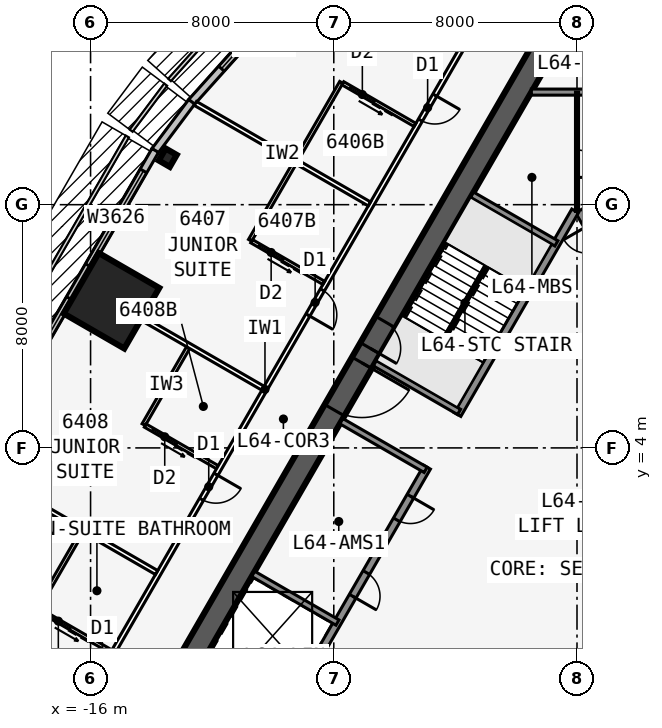
"""IFC4 building model, lengths in metres.
Left out: names, types, materials, properties, quantities, classifications, styles, units other than length and angle.
Written with IfcOpenShell. Run it as: python <this file> out.ifc"""

import sys

from ifc_helpers import new_model, si_unit, direction, frame, frame_2d, origin, origin_2d, place, context, subcontext, project, spatial, rectangle, i_section, extrude, element, fill, save


model = new_model("IFC4")
c1 = context("Model", 3, precision=1e-05, world=origin(), true_north=direction((0.0, 1.0)))
c2 = subcontext(c1, "Body", "Model", "MODEL_VIEW")
j1 = project(units=[si_unit("LENGTHUNIT", "METRE"), si_unit("PLANEANGLEUNIT", "RADIAN")], contexts=[c1])
p1 = place(None, origin())
s1 = spatial("IfcSite", under=j1, at=p1, CompositionType="ELEMENT")
p2 = place(p1, origin())
s2 = spatial("IfcBuilding", under=s1, at=p2, CompositionType="ELEMENT")
p3 = place(p2, frame((0.0, 0.0, 242.9)))
s3 = spatial("IfcBuildingStorey", under=s2, at=p3, CompositionType="ELEMENT", Elevation=242.9)
p4 = place(p3, frame((16.5, -9.526, 0.0), z_axis=(0.0, 0.0, 1.0), x_axis=(-0.499999749417, 0.866025548458, 0.0)))
e1 = element("IfcWall", 1, at=p4, inside=s3, PredefinedType="SHEAR", context=c2, shape_type="SweptSolid", body=[
    extrude(rectangle(XDim=33.0, YDim=0.75, at=frame_2d((16.5, 0.0))), origin(), (0.0, 0.0, 1.0), 3.6),
])
p5 = place(p4, frame((14.15, 0.0, 0.0)))
e2 = element("IfcOpeningElement", 2, at=p5, cuts=e1, PredefinedType="OPENING", context=c2, shape_type="SweptSolid", body=[
    extrude(rectangle(XDim=1.8, YDim=2.13, at=frame_2d((0.9, 1.065))), frame((0.0, 0.385, 0.0), z_axis=(0.0, -1.0, 0.0), x_axis=(1.0, 0.0, 0.0)), (0.0, 0.0, 1.0), 0.77),
])
p6 = place(p4, frame((12.6, 0.0, 0.0)))
e3 = element("IfcOpeningElement", 3, at=p6, cuts=e1, PredefinedType="OPENING", context=c2, shape_type="SweptSolid", body=[
    extrude(rectangle(XDim=1.0, YDim=2.13, at=frame_2d((0.5, 1.065))), frame((0.0, 0.385, 0.0), z_axis=(0.0, -1.0, 0.0), x_axis=(1.0, 0.0, 0.0)), (0.0, 0.0, 1.0), 0.77),
])
p7 = place(p3, frame((5.379, 2.586, 0.0), z_axis=(0.0, 0.0, 1.0), x_axis=(-0.500001375892, 0.866024609411, 0.0)))
e4 = element("IfcWall", 4, at=p7, inside=s3, PredefinedType="SOLIDWALL", context=c2, shape_type="SweptSolid", body=[
    extrude(rectangle(XDim=10.633, YDim=0.25, at=frame_2d((5.316, 0.0))), origin(), (0.0, 0.0, 1.0), 3.435),
])
p8 = place(p7, frame((9.164, 0.0, 0.0)))
e5 = element("IfcOpeningElement", 5, at=p8, cuts=e4, PredefinedType="OPENING", context=c2, shape_type="SweptSolid", body=[
    extrude(rectangle(XDim=0.9, YDim=2.13, at=frame_2d((0.45, 1.065))), frame((0.0, 0.135, 0.0), z_axis=(0.0, -1.0, 0.0), x_axis=(1.0, 0.0, 0.0)), (0.0, 0.0, 1.0), 0.27),
])
p9 = place(p7, frame((1.0, 0.0, 0.0)))
e6 = element("IfcOpeningElement", 6, at=p9, cuts=e4, PredefinedType="OPENING", context=c2, shape_type="SweptSolid", body=[
    extrude(rectangle(XDim=1.1, YDim=2.13, at=frame_2d((0.55, 1.065))), frame((0.0, 0.135, 0.0), z_axis=(0.0, -1.0, 0.0), x_axis=(1.0, 0.0, 0.0)), (0.0, 0.0, 1.0), 0.27),
])
p10 = place(p7, frame((3.9, 0.0, 0.0)))
e7 = element("IfcOpeningElement", 7, at=p10, cuts=e4, PredefinedType="OPENING", context=c2, shape_type="SweptSolid", body=[
    extrude(rectangle(XDim=1.1, YDim=2.13, at=frame_2d((0.55, 1.065))), frame((0.0, 0.135, 0.0), z_axis=(0.0, -1.0, 0.0), x_axis=(1.0, 0.0, 0.0)), (0.0, 0.0, 1.0), 0.27),
])
p11 = place(p7, frame((6.8, 0.0, 0.0)))
e8 = element("IfcOpeningElement", 8, at=p11, cuts=e4, PredefinedType="OPENING", context=c2, shape_type="SweptSolid", body=[
    extrude(rectangle(XDim=1.1, YDim=2.13, at=frame_2d((0.55, 1.065))), frame((0.0, 0.135, 0.0), z_axis=(0.0, -1.0, 0.0), x_axis=(1.0, 0.0, 0.0)), (0.0, 0.0, 1.0), 0.27),
])
p12 = place(p3, frame((0.0, 19.052, 0.0), z_axis=(0.0, 0.0, 1.0), x_axis=(-0.499999749417, -0.866025548458, 0.0)))
e9 = element("IfcWall", 9, at=p12, inside=s3, PredefinedType="SHEAR", context=c2, shape_type="SweptSolid", body=[
    extrude(rectangle(XDim=33.0, YDim=0.75, at=frame_2d((16.5, 0.0))), origin(), (0.0, 0.0, 1.0), 3.6),
])
p13 = place(p12, frame((14.15, 0.0, 0.0)))
e10 = element("IfcOpeningElement", 10, at=p13, cuts=e9, PredefinedType="OPENING", context=c2, shape_type="SweptSolid", body=[
    extrude(rectangle(XDim=1.8, YDim=2.13, at=frame_2d((0.9, 1.065))), frame((0.0, 0.385, 0.0), z_axis=(0.0, -1.0, 0.0), x_axis=(1.0, 0.0, 0.0)), (0.0, 0.0, 1.0), 0.77),
])
p14 = place(p12, frame((12.6, 0.0, 0.0)))
e11 = element("IfcOpeningElement", 11, at=p14, cuts=e9, PredefinedType="OPENING", context=c2, shape_type="SweptSolid", body=[
    extrude(rectangle(XDim=1.0, YDim=2.13, at=frame_2d((0.5, 1.065))), frame((0.0, 0.385, 0.0), z_axis=(0.0, -1.0, 0.0), x_axis=(1.0, 0.0, 0.0)), (0.0, 0.0, 1.0), 0.77),
])
p15 = place(p3, frame((-0.062, 11.794, 0.0), z_axis=(0.0, 0.0, 1.0), x_axis=(-0.500006680225, -0.86602154692, 0.0)))
e12 = element("IfcWall", 12, at=p15, inside=s3, PredefinedType="SOLIDWALL", context=c2, shape_type="SweptSolid", body=[
    extrude(rectangle(XDim=7.733, YDim=0.25, at=frame_2d((3.866, 0.0))), origin(), (0.0, 0.0, 1.0), 3.435),
])
p16 = place(p3, frame((-4.929, 3.365, 0.0), z_axis=(0.0, 0.0, 1.0), x_axis=(-0.499991433582, -0.866030349552, 0.0)))
e13 = element("IfcWall", 13, at=p16, inside=s3, PredefinedType="SOLIDWALL", context=c2, shape_type="SweptSolid", body=[
    extrude(rectangle(XDim=10.633, YDim=0.25, at=frame_2d((5.316, 0.0))), origin(), (0.0, 0.0, 1.0), 3.435),
])
p17 = place(p16, frame((9.164, 0.0, 0.0)))
e14 = element("IfcOpeningElement", 14, at=p17, cuts=e13, PredefinedType="OPENING", context=c2, shape_type="SweptSolid", body=[
    extrude(rectangle(XDim=0.9, YDim=2.13, at=frame_2d((0.45, 1.065))), frame((0.0, 0.135, 0.0), z_axis=(0.0, -1.0, 0.0), x_axis=(1.0, 0.0, 0.0)), (0.0, 0.0, 1.0), 0.27),
])
p18 = place(p16, frame((1.1, 0.0, 0.0)))
e15 = element("IfcOpeningElement", 15, at=p18, cuts=e13, PredefinedType="OPENING", context=c2, shape_type="SweptSolid", body=[
    extrude(rectangle(XDim=0.9, YDim=2.13, at=frame_2d((0.45, 1.065))), frame((0.0, 0.135, 0.0), z_axis=(0.0, -1.0, 0.0), x_axis=(1.0, 0.0, 0.0)), (0.0, 0.0, 1.0), 0.27),
])
p19 = place(p16, frame((4.0, 0.0, 0.0)))
e16 = element("IfcOpeningElement", 16, at=p19, cuts=e13, PredefinedType="OPENING", context=c2, shape_type="SweptSolid", body=[
    extrude(rectangle(XDim=0.9, YDim=2.13, at=frame_2d((0.45, 1.065))), frame((0.0, 0.135, 0.0), z_axis=(0.0, -1.0, 0.0), x_axis=(1.0, 0.0, 0.0)), (0.0, 0.0, 1.0), 0.27),
])
for number, where, z_axis, x_axis in (
    (17, (-0.679, 10.727, 0.0), (0.0, 0.0, 1.0), (-0.866, 0.5, 0.0)),
    (18, (-3.879, 5.184, 0.0), (0.0, 0.0, 1.0), (-0.866, 0.5, 0.0)),
    (19, (-4.979, 3.279, 0.0), (0.0, 0.0, 1.0), (-0.866, 0.5, 0.0)),
    (20, (-7.879, -1.744, 0.0), (0.0, 0.0, 1.0), (-0.866, 0.5, 0.0)),
):
    element("IfcWall", number, at=place(p3, frame(where, z_axis=z_axis, x_axis=x_axis)), inside=s3, PredefinedType="SOLIDWALL", context=c2, shape_type="SweptSolid", body=[
        extrude(rectangle(XDim=3.2, YDim=0.2, at=frame_2d((1.6, 0.0))), origin(), (0.0, 0.0, 1.0), 3.435),
    ])
p20 = place(p3, frame((-13.461, 13.545, 0.0), z_axis=(0.0, 0.0, 1.0), x_axis=(-0.866025403784, 0.5, 0.0)))
e21 = element("IfcColumn", 21, at=p20, inside=s3, PredefinedType="COLUMN", context=c2, shape_type="SweptSolid", body=[
    extrude(i_section(OverallWidth=0.419, OverallDepth=0.455, WebThickness=0.042, FlangeThickness=0.068, at=origin_2d()), origin(), (0.0, 0.0, 1.0), 3.6),
])
p21 = place(p3, frame((-15.312, 8.84, 0.0), z_axis=(0.0, 0.0, 1.0), x_axis=(-0.866025403784, 0.5, 0.0)))
e22 = element("IfcColumn", 22, at=p21, inside=s3, PredefinedType="COLUMN", context=c2, shape_type="SweptSolid", body=[
    extrude(rectangle(XDim=2.3, YDim=2.3, at=origin_2d()), origin(), (0.0, 0.0, 1.0), 3.6),
])
p22 = place(p3, frame((-7.907, 20.701, 0.0), z_axis=(0.0, 0.0, 1.0), x_axis=(-0.667303550892, -0.744785855778, 0.0)))
e23 = element("IfcWall", 23, at=p22, inside=s3, PredefinedType="STANDARD", context=c2, shape_type="SweptSolid", body=[
    extrude(rectangle(XDim=7.153, YDim=0.25, at=frame_2d((3.576, 0.0))), origin(), (0.0, 0.0, 1.0), 3.435),
])
p23 = place(p22, frame((1.476, 0.0, 0.45)))
e24 = element("IfcOpeningElement", 24, at=p23, cuts=e23, PredefinedType="OPENING", context=c2, shape_type="SweptSolid", body=[
    extrude(rectangle(XDim=4.2, YDim=2.6, at=frame_2d((2.1, 1.3))), frame((0.0, 0.135, 0.0), z_axis=(0.0, -1.0, 0.0), x_axis=(1.0, 0.0, 0.0)), (0.0, 0.0, 1.0), 0.27),
])
p24 = place(p3, frame((-12.673, 15.382, 0.0), z_axis=(0.0, 0.0, 1.0), x_axis=(-0.599650843534, -0.800261748335, 0.0)))
e25 = element("IfcWall", 25, at=p24, inside=s3, PredefinedType="STANDARD", context=c2, shape_type="SweptSolid", body=[
    extrude(rectangle(XDim=2.014, YDim=0.25, at=frame_2d((1.007, 0.0))), origin(), (0.0, 0.0, 1.0), 3.435),
])
p25 = place(p3, frame((-13.873, 13.783, 0.0), z_axis=(0.0, 0.0, 1.0), x_axis=(-0.499993662806, -0.866029062534, 0.0)))
e26 = element("IfcWall", 26, at=p25, inside=s3, PredefinedType="STANDARD", context=c2, shape_type="SweptSolid", body=[
    extrude(rectangle(XDim=10.0, YDim=0.25, at=frame_2d((5.0, 0.0))), origin(), (0.0, 0.0, 1.0), 3.435),
])
p26 = place(p25, frame((0.775, 0.0, 0.45)))
e27 = element("IfcOpeningElement", 27, at=p26, cuts=e26, PredefinedType="OPENING", context=c2, shape_type="SweptSolid", body=[
    extrude(rectangle(XDim=3.6, YDim=2.6, at=frame_2d((1.8, 1.3))), frame((0.0, 0.135, 0.0), z_axis=(0.0, -1.0, 0.0), x_axis=(1.0, 0.0, 0.0)), (0.0, 0.0, 1.0), 0.27),
])
p27 = place(p25, frame((5.625, 0.0, 0.45)))
e28 = element("IfcOpeningElement", 28, at=p27, cuts=e26, PredefinedType="OPENING", context=c2, shape_type="SweptSolid", body=[
    extrude(rectangle(XDim=3.6, YDim=2.6, at=frame_2d((1.8, 1.3))), frame((0.0, 0.135, 0.0), z_axis=(0.0, -1.0, 0.0), x_axis=(1.0, 0.0, 0.0)), (0.0, 0.0, 1.0), 0.27),
])
p28 = place(p3, frame((-0.425, 22.966, 0.0), z_axis=(0.0, 0.0, 1.0), x_axis=(-0.500000265775, -0.866025250339, 0.0)))
e29 = element("IfcWall", 29, at=p28, inside=s3, PredefinedType="PARTITIONING", context=c2, shape_type="SweptSolid", body=[
    extrude(rectangle(XDim=39.354, YDim=0.15, at=frame_2d((19.677, 0.0))), origin(), (0.0, 0.0, 1.0), 3.435),
])
p29 = place(p28, frame((8.502, 0.0, 0.0)))
e30 = element("IfcOpeningElement", 30, at=p29, cuts=e29, PredefinedType="OPENING", context=c2, shape_type="SweptSolid", body=[
    extrude(rectangle(XDim=0.95, YDim=2.13, at=frame_2d((0.475, 1.065))), frame((0.0, 0.085, 0.0), z_axis=(0.0, -1.0, 0.0), x_axis=(1.0, 0.0, 0.0)), (0.0, 0.0, 1.0), 0.17),
])
p30 = place(p28, frame((15.902, 0.0, 0.0)))
e31 = element("IfcOpeningElement", 31, at=p30, cuts=e29, PredefinedType="OPENING", context=c2, shape_type="SweptSolid", body=[
    extrude(rectangle(XDim=0.95, YDim=2.13, at=frame_2d((0.475, 1.065))), frame((0.0, 0.085, 0.0), z_axis=(0.0, -1.0, 0.0), x_axis=(1.0, 0.0, 0.0)), (0.0, 0.0, 1.0), 0.17),
])
p31 = place(p28, frame((22.902, 0.0, 0.0)))
e32 = element("IfcOpeningElement", 32, at=p31, cuts=e29, PredefinedType="OPENING", context=c2, shape_type="SweptSolid", body=[
    extrude(rectangle(XDim=0.95, YDim=2.13, at=frame_2d((0.475, 1.065))), frame((0.0, 0.085, 0.0), z_axis=(0.0, -1.0, 0.0), x_axis=(1.0, 0.0, 0.0)), (0.0, 0.0, 1.0), 0.17),
])
p32 = place(p28, frame((29.902, 0.0, 0.0)))
e33 = element("IfcOpeningElement", 33, at=p32, cuts=e29, PredefinedType="OPENING", context=c2, shape_type="SweptSolid", body=[
    extrude(rectangle(XDim=0.95, YDim=2.13, at=frame_2d((0.475, 1.065))), frame((0.0, 0.085, 0.0), z_axis=(0.0, -1.0, 0.0), x_axis=(1.0, 0.0, 0.0)), (0.0, 0.0, 1.0), 0.17),
])
p33 = place(p3, frame((-6.829, 12.025, 0.0), z_axis=(0.0, 0.0, 1.0), x_axis=(-0.866029323189, 0.499993211332, 0.0)))
e34 = element("IfcWall", 34, at=p33, inside=s3, PredefinedType="PARTITIONING", context=c2, shape_type="SweptSolid", body=[
    extrude(rectangle(XDim=6.608, YDim=0.15, at=frame_2d((3.304, 0.0))), origin(), (0.0, 0.0, 1.0), 2.678),
])
p34 = place(p3, frame((-10.329, 5.963, 0.0), z_axis=(0.0, 0.0, 1.0), x_axis=(-0.866011785882, 0.500023586156, 0.0)))
e35 = element("IfcWall", 35, at=p34, inside=s3, PredefinedType="PARTITIONING", context=c2, shape_type="SweptSolid", body=[
    extrude(rectangle(XDim=6.854, YDim=0.15, at=frame_2d((3.427, 0.0))), origin(), (0.0, 0.0, 1.0), 2.678),
])
p35 = place(p3, frame((-13.829, -0.099, 0.0), z_axis=(0.0, 0.0, 1.0), x_axis=(-0.866022562216, 0.500004921708, 0.0)))
e36 = element("IfcWall", 36, at=p35, inside=s3, PredefinedType="PARTITIONING", context=c2, shape_type="SweptSolid", body=[
    extrude(rectangle(XDim=6.609, YDim=0.15, at=frame_2d((3.304, 0.0))), origin(), (0.0, 0.0, 1.0), 2.678),
])
p36 = place(p3, frame((-7.753, 16.023, 0.0), z_axis=(0.0, 0.0, 1.0), x_axis=(-0.499990139034, -0.866031096941, 0.0)))
e37 = element("IfcWall", 37, at=p36, inside=s3, PredefinedType="PLUMBINGWALL", context=c2, shape_type="SweptSolid", body=[
    extrude(rectangle(XDim=3.0, YDim=0.12, at=frame_2d((1.5, 0.0))), origin(), (0.0, 0.0, 1.0), 3.435),
])
p37 = place(p3, frame((-5.329, 14.623, 0.0), z_axis=(0.0, 0.0, 1.0), x_axis=(-0.865997131366, 0.500048966069, 0.0)))
e38 = element("IfcWall", 38, at=p37, inside=s3, PredefinedType="PLUMBINGWALL", context=c2, shape_type="SweptSolid", body=[
    extrude(rectangle(XDim=2.74, YDim=0.12, at=frame_2d((1.37, 0.0))), origin(), (0.0, 0.0, 1.0), 3.435),
])
p38 = place(p37, frame((1.55, 0.0, 0.0)))
e39 = element("IfcOpeningElement", 39, at=p38, cuts=e38, PredefinedType="OPENING", context=c2, shape_type="SweptSolid", body=[
    extrude(rectangle(XDim=0.9, YDim=2.13, at=frame_2d((0.45, 1.065))), frame((0.0, 0.07, 0.0), z_axis=(0.0, -1.0, 0.0), x_axis=(1.0, 0.0, 0.0)), (0.0, 0.0, 1.0), 0.14),
])
p39 = place(p3, frame((-9.253, 13.425, 0.0), z_axis=(0.0, 0.0, 1.0), x_axis=(-0.499990139034, -0.866031096941, 0.0)))
e40 = element("IfcWall", 40, at=p39, inside=s3, PredefinedType="PLUMBINGWALL", context=c2, shape_type="SweptSolid", body=[
    extrude(rectangle(XDim=3.0, YDim=0.12, at=frame_2d((1.5, 0.0))), origin(), (0.0, 0.0, 1.0), 3.435),
])
p40 = place(p3, frame((-8.329, 9.427, 0.0), z_axis=(0.0, 0.0, 1.0), x_axis=(-0.866035715982, 0.499982138324, 0.0)))
e41 = element("IfcWall", 41, at=p40, inside=s3, PredefinedType="PLUMBINGWALL", context=c2, shape_type="SweptSolid", body=[
    extrude(rectangle(XDim=2.74, YDim=0.12, at=frame_2d((1.37, 0.0))), origin(), (0.0, 0.0, 1.0), 3.435),
])
p41 = place(p40, frame((1.55, 0.0, 0.0)))
e42 = element("IfcOpeningElement", 42, at=p41, cuts=e41, PredefinedType="OPENING", context=c2, shape_type="SweptSolid", body=[
    extrude(rectangle(XDim=0.9, YDim=2.13, at=frame_2d((0.45, 1.065))), frame((0.0, 0.07, 0.0), z_axis=(0.0, -1.0, 0.0), x_axis=(1.0, 0.0, 0.0)), (0.0, 0.0, 1.0), 0.14),
])
p42 = place(p3, frame((-12.753, 7.363, 0.0), z_axis=(0.0, 0.0, 1.0), x_axis=(-0.50002537861, -0.866010750942, 0.0)))
e43 = element("IfcWall", 43, at=p42, inside=s3, PredefinedType="PLUMBINGWALL", context=c2, shape_type="SweptSolid", body=[
    extrude(rectangle(XDim=3.0, YDim=0.12, at=frame_2d((1.5, 0.0))), origin(), (0.0, 0.0, 1.0), 3.435),
])
p43 = place(p3, frame((-11.829, 3.365, 0.0), z_axis=(0.0, 0.0, 1.0), x_axis=(-0.865997131366, 0.500048966069, 0.0)))
e44 = element("IfcWall", 44, at=p43, inside=s3, PredefinedType="PLUMBINGWALL", context=c2, shape_type="SweptSolid", body=[
    extrude(rectangle(XDim=2.74, YDim=0.12, at=frame_2d((1.37, 0.0))), origin(), (0.0, 0.0, 1.0), 3.435),
])
p44 = place(p43, frame((1.55, 0.0, 0.0)))
e45 = element("IfcOpeningElement", 45, at=p44, cuts=e44, PredefinedType="OPENING", context=c2, shape_type="SweptSolid", body=[
    extrude(rectangle(XDim=0.9, YDim=2.13, at=frame_2d((0.45, 1.065))), frame((0.0, 0.07, 0.0), z_axis=(0.0, -1.0, 0.0), x_axis=(1.0, 0.0, 0.0)), (0.0, 0.0, 1.0), 0.14),
])
p45 = place(p3, frame((-16.253, 1.301, 0.0), z_axis=(0.0, 0.0, 1.0), x_axis=(-0.499990139034, -0.866031096941, 0.0)))
e46 = element("IfcWall", 46, at=p45, inside=s3, PredefinedType="PLUMBINGWALL", context=c2, shape_type="SweptSolid", body=[
    extrude(rectangle(XDim=3.0, YDim=0.12, at=frame_2d((1.5, 0.0))), origin(), (0.0, 0.0, 1.0), 3.435),
])
p46 = place(p3, frame((-15.329, -2.697, 0.0), z_axis=(0.0, 0.0, 1.0), x_axis=(-0.866035715982, 0.499982138324, 0.0)))
e47 = element("IfcWall", 47, at=p46, inside=s3, PredefinedType="PLUMBINGWALL", context=c2, shape_type="SweptSolid", body=[
    extrude(rectangle(XDim=2.74, YDim=0.12, at=frame_2d((1.37, 0.0))), origin(), (0.0, 0.0, 1.0), 3.435),
])
p47 = place(p46, frame((1.55, 0.0, 0.0)))
e48 = element("IfcOpeningElement", 48, at=p47, cuts=e47, PredefinedType="OPENING", context=c2, shape_type="SweptSolid", body=[
    extrude(rectangle(XDim=0.9, YDim=2.13, at=frame_2d((0.45, 1.065))), frame((0.0, 0.07, 0.0), z_axis=(0.0, -1.0, 0.0), x_axis=(1.0, 0.0, 0.0)), (0.0, 0.0, 1.0), 0.14),
])
p48 = place(p3, frame((-1.501, 15.703, 0.0), z_axis=(0.0, 0.0, 1.0), x_axis=(1.0, 0.0, 0.0)))
e49 = element("IfcWall", 49, at=p48, inside=s3, PredefinedType="SOLIDWALL", context=c2, shape_type="SweptSolid", body=[
    extrude(rectangle(XDim=3.002, YDim=0.2, at=frame_2d((1.501, 0.0))), origin(), (0.0, 0.0, 1.0), 3.435),
])
p49 = place(p3, frame((0.0, 15.703, 0.0), z_axis=(0.0, 0.0, 1.0), x_axis=(0.0, -1.0, 0.0)))
e50 = element("IfcWall", 50, at=p49, inside=s3, PredefinedType="PARTITIONING", context=c2, shape_type="SweptSolid", body=[
    extrude(rectangle(XDim=3.925, YDim=0.1, at=frame_2d((1.963, 0.0))), origin(), (0.0, 0.0, 1.0), 3.435),
])
p50 = place(p49, frame((1.905, 0.0, 0.0)))
e51 = element("IfcOpeningElement", 51, at=p50, cuts=e50, PredefinedType="OPENING", context=c2, shape_type="SweptSolid", body=[
    extrude(rectangle(XDim=0.9, YDim=2.13, at=frame_2d((0.45, 1.065))), frame((0.0, 0.06, 0.0), z_axis=(0.0, -1.0, 0.0), x_axis=(1.0, 0.0, 0.0)), (0.0, 0.0, 1.0), 0.12),
])
p51 = place(p3, frame((-2.988, 9.978, 0.0), z_axis=(0.0, 0.0, 1.0), x_axis=(-0.499992232847, -0.866029888106, 0.0)))
e52 = element("IfcWall", 52, at=p51, inside=s3, PredefinedType="SOLIDWALL", context=c2, shape_type="SweptSolid", body=[
    extrude(rectangle(XDim=2.794, YDim=0.1, at=frame_2d((1.397, 0.0))), origin(), (0.0, 0.0, 1.0), 3.6),
])
p52 = place(p23, origin())
e53 = element("IfcWindow", 53, at=p52, inside=s3, PartitioningType="SINGLE_PANEL", PredefinedType="WINDOW", context=c2, shape_type="SweptSolid", body=[
    extrude(rectangle(XDim=4.2, YDim=2.6, at=frame_2d((2.1, 1.3))), frame((0.0, 0.03, 0.0), z_axis=(0.0, -1.0, 0.0), x_axis=(1.0, 0.0, 0.0)), (0.0, 0.0, 1.0), 0.06),
])
fill(e24, e53)
p53 = place(p26, origin())
e54 = element("IfcWindow", 54, at=p53, inside=s3, PartitioningType="SINGLE_PANEL", PredefinedType="WINDOW", context=c2, shape_type="SweptSolid", body=[
    extrude(rectangle(XDim=3.6, YDim=2.6, at=frame_2d((1.8, 1.3))), frame((0.0, 0.03, 0.0), z_axis=(0.0, -1.0, 0.0), x_axis=(1.0, 0.0, 0.0)), (0.0, 0.0, 1.0), 0.06),
])
fill(e27, e54)
p54 = place(p27, origin())
e55 = element("IfcWindow", 55, at=p54, inside=s3, PartitioningType="SINGLE_PANEL", PredefinedType="WINDOW", context=c2, shape_type="SweptSolid", body=[
    extrude(rectangle(XDim=3.6, YDim=2.6, at=frame_2d((1.8, 1.3))), frame((0.0, 0.03, 0.0), z_axis=(0.0, -1.0, 0.0), x_axis=(1.0, 0.0, 0.0)), (0.0, 0.0, 1.0), 0.06),
])
fill(e28, e55)
p55 = place(p38, origin())
e56 = element("IfcDoor", 56, at=p55, inside=s3, OperationType="SLIDING_TO_LEFT", PredefinedType="DOOR", context=c2, shape_type="SweptSolid", body=[
    extrude(rectangle(XDim=0.9, YDim=2.13, at=frame_2d((0.45, 1.065))), frame((0.0, 0.025, 0.0), z_axis=(0.0, -1.0, 0.0), x_axis=(1.0, 0.0, 0.0)), (0.0, 0.0, 1.0), 0.05),
])
fill(e39, e56)
p56 = place(p29, origin())
e57 = element("IfcDoor", 57, at=p56, inside=s3, OperationType="SINGLE_SWING_LEFT", PredefinedType="DOOR", context=c2, shape_type="SweptSolid", body=[
    extrude(rectangle(XDim=0.95, YDim=2.13, at=frame_2d((0.475, 1.065))), frame((0.0, 0.025, 0.0), z_axis=(0.0, -1.0, 0.0), x_axis=(1.0, 0.0, 0.0)), (0.0, 0.0, 1.0), 0.05),
])
fill(e30, e57)
p57 = place(p41, origin())
e58 = element("IfcDoor", 58, at=p57, inside=s3, OperationType="SLIDING_TO_LEFT", PredefinedType="DOOR", context=c2, shape_type="SweptSolid", body=[
    extrude(rectangle(XDim=0.9, YDim=2.13, at=frame_2d((0.45, 1.065))), frame((0.0, 0.025, 0.0), z_axis=(0.0, -1.0, 0.0), x_axis=(1.0, 0.0, 0.0)), (0.0, 0.0, 1.0), 0.05),
])
fill(e42, e58)
p58 = place(p30, origin())
e59 = element("IfcDoor", 59, at=p58, inside=s3, OperationType="SINGLE_SWING_RIGHT", PredefinedType="DOOR", context=c2, shape_type="SweptSolid", body=[
    extrude(rectangle(XDim=0.95, YDim=2.13, at=frame_2d((0.475, 1.065))), frame((0.0, 0.025, 0.0), z_axis=(0.0, -1.0, 0.0), x_axis=(1.0, 0.0, 0.0)), (0.0, 0.0, 1.0), 0.05),
])
fill(e31, e59)
p59 = place(p44, origin())
e60 = element("IfcDoor", 60, at=p59, inside=s3, OperationType="SLIDING_TO_LEFT", PredefinedType="DOOR", context=c2, shape_type="SweptSolid", body=[
    extrude(rectangle(XDim=0.9, YDim=2.13, at=frame_2d((0.45, 1.065))), frame((0.0, 0.025, 0.0), z_axis=(0.0, -1.0, 0.0), x_axis=(1.0, 0.0, 0.0)), (0.0, 0.0, 1.0), 0.05),
])
fill(e45, e60)
p60 = place(p31, origin())
e61 = element("IfcDoor", 61, at=p60, inside=s3, OperationType="SINGLE_SWING_LEFT", PredefinedType="DOOR", context=c2, shape_type="SweptSolid", body=[
    extrude(rectangle(XDim=0.95, YDim=2.13, at=frame_2d((0.475, 1.065))), frame((0.0, 0.025, 0.0), z_axis=(0.0, -1.0, 0.0), x_axis=(1.0, 0.0, 0.0)), (0.0, 0.0, 1.0), 0.05),
])
fill(e32, e61)
p61 = place(p47, origin())
e62 = element("IfcDoor", 62, at=p61, inside=s3, OperationType="SLIDING_TO_LEFT", PredefinedType="DOOR", context=c2, shape_type="SweptSolid", body=[
    extrude(rectangle(XDim=0.9, YDim=2.13, at=frame_2d((0.45, 1.065))), frame((0.0, 0.025, 0.0), z_axis=(0.0, -1.0, 0.0), x_axis=(1.0, 0.0, 0.0)), (0.0, 0.0, 1.0), 0.05),
])
fill(e48, e62)
p62 = place(p13, origin())
e63 = element("IfcDoor", 63, at=p62, inside=s3, OperationType="DOUBLE_DOOR_SINGLE_SWING", PredefinedType="DOOR", context=c2, shape_type="SweptSolid", body=[
    extrude(rectangle(XDim=1.8, YDim=2.13, at=frame_2d((0.9, 1.065))), frame((0.0, 0.025, 0.0), z_axis=(0.0, -1.0, 0.0), x_axis=(1.0, 0.0, 0.0)), (0.0, 0.0, 1.0), 0.05),
])
fill(e10, e63)
p63 = place(p14, origin())
e64 = element("IfcDoor", 64, at=p63, inside=s3, OperationType="SINGLE_SWING_RIGHT", PredefinedType="DOOR", context=c2, shape_type="SweptSolid", body=[
    extrude(rectangle(XDim=1.0, YDim=2.13, at=frame_2d((0.5, 1.065))), frame((0.0, 0.025, 0.0), z_axis=(0.0, -1.0, 0.0), x_axis=(1.0, 0.0, 0.0)), (0.0, 0.0, 1.0), 0.05),
])
fill(e11, e64)
p64 = place(p50, origin())
e65 = element("IfcDoor", 65, at=p64, inside=s3, OperationType="SINGLE_SWING_RIGHT", PredefinedType="DOOR", context=c2, shape_type="SweptSolid", body=[
    extrude(rectangle(XDim=0.9, YDim=2.13, at=frame_2d((0.45, 1.065))), frame((0.0, 0.025, 0.0), z_axis=(0.0, -1.0, 0.0), x_axis=(1.0, 0.0, 0.0)), (0.0, 0.0, 1.0), 0.05),
])
fill(e51, e65)
p65 = place(p18, origin())
e66 = element("IfcDoor", 66, at=p65, inside=s3, OperationType="SINGLE_SWING_LEFT", PredefinedType="DOOR", context=c2, shape_type="SweptSolid", body=[
    extrude(rectangle(XDim=0.9, YDim=2.13, at=frame_2d((0.45, 1.065))), frame((0.0, 0.025, 0.0), z_axis=(0.0, -1.0, 0.0), x_axis=(1.0, 0.0, 0.0)), (0.0, 0.0, 1.0), 0.05),
])
fill(e15, e66)
p66 = place(p19, origin())
e67 = element("IfcDoor", 67, at=p66, inside=s3, OperationType="SINGLE_SWING_RIGHT", PredefinedType="DOOR", context=c2, shape_type="SweptSolid", body=[
    extrude(rectangle(XDim=0.9, YDim=2.13, at=frame_2d((0.45, 1.065))), frame((0.0, 0.025, 0.0), z_axis=(0.0, -1.0, 0.0), x_axis=(1.0, 0.0, 0.0)), (0.0, 0.0, 1.0), 0.05),
])
fill(e16, e67)
save(model, sys.argv[1])
